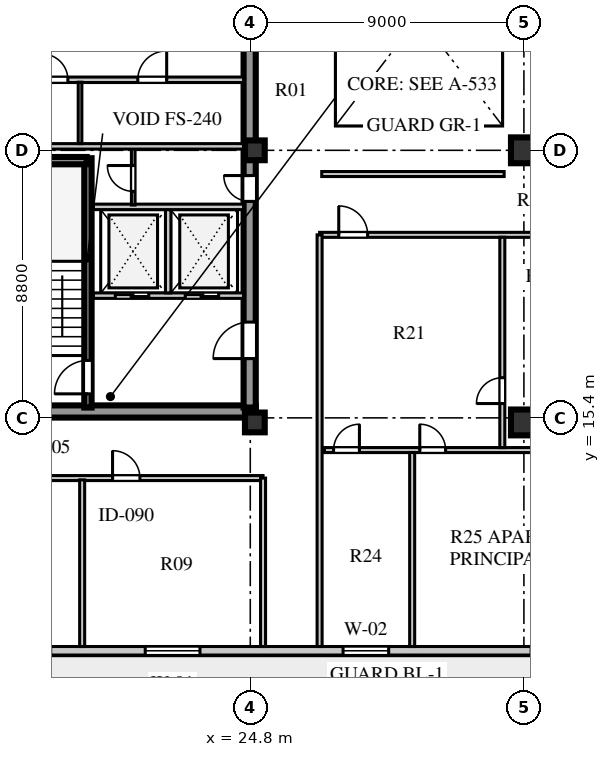
"""IFC4 building model, lengths in metres.
Left out: names, types, materials, properties, quantities, classifications, styles, units other than length and angle.
Written with IfcOpenShell. Run it as: python <this file> out.ifc"""

import sys

from ifc_helpers import new_model, si_unit, direction, frame, frame_2d, origin, origin_2d, place, context, subcontext, project, spatial, rectangle, extrude, element, fill, save


model = new_model("IFC4")
c1 = context("Model", 3, precision=1e-05, world=origin(), true_north=direction((0.0, 1.0)))
c2 = subcontext(c1, "Body", "Model", "MODEL_VIEW")
j1 = project(units=[si_unit("LENGTHUNIT", "METRE"), si_unit("PLANEANGLEUNIT", "RADIAN")], contexts=[c1])
p1 = place(None, origin())
s1 = spatial("IfcSite", under=j1, at=p1, CompositionType="ELEMENT")
p2 = place(p1, origin())
s2 = spatial("IfcBuilding", under=s1, at=p2, CompositionType="ELEMENT")
p3 = place(p2, frame((0.0, 0.0, 253.1)))
s3 = spatial("IfcBuildingStorey", under=s2, at=p3, CompositionType="ELEMENT", Elevation=253.1)
p4 = place(p3, frame((15.5, 15.61, 0.0), z_axis=(0.0, 0.0, 1.0), x_axis=(1.0, 0.0, 0.0)))
e1 = element("IfcWall", 1, at=p4, inside=s3, PredefinedType="SHEAR", context=c2, shape_type="SweptSolid", body=[
    extrude(rectangle(XDim=9.48, YDim=0.4, at=frame_2d((4.74, 0.0))), origin(), (0.0, 0.0, 1.0), 3.66),
])
p5 = place(p3, frame((24.78, 15.74, 0.0), z_axis=(0.0, 0.0, 1.0), x_axis=(0.0, 1.0, 0.0)))
e2 = element("IfcWall", 2, at=p5, inside=s3, PredefinedType="SHEAR", context=c2, shape_type="SweptSolid", body=[
    extrude(rectangle(XDim=25.76, YDim=0.4, at=frame_2d((12.88, 0.0))), origin(), (0.0, 0.0, 1.0), 3.66),
])
p6 = place(p5, frame((1.61, 0.0, 0.0)))
e3 = element("IfcOpeningElement", 3, at=p6, cuts=e2, PredefinedType="OPENING", context=c2, shape_type="SweptSolid", body=[
    extrude(rectangle(XDim=1.2, YDim=2.1, at=frame_2d((0.6, 1.05))), frame((0.0, 0.21, 0.0), z_axis=(0.0, -1.0, 0.0), x_axis=(1.0, 0.0, 0.0)), (0.0, 0.0, 1.0), 0.42),
])
p7 = place(p5, frame((6.78, 0.0, 0.0)))
e4 = element("IfcOpeningElement", 4, at=p7, cuts=e2, PredefinedType="OPENING", context=c2, shape_type="SweptSolid", body=[
    extrude(rectangle(XDim=0.85, YDim=2.06, at=frame_2d((0.425, 1.03))), frame((0.0, 0.21, 0.0), z_axis=(0.0, -1.0, 0.0), x_axis=(1.0, 0.0, 0.0)), (0.0, 0.0, 1.0), 0.42),
])
p8 = place(p5, frame((12.11, 0.0, 0.0)))
e5 = element("IfcOpeningElement", 5, at=p8, cuts=e2, PredefinedType="OPENING", context=c2, shape_type="SweptSolid", body=[
    extrude(rectangle(XDim=1.5, YDim=2.12, at=frame_2d((0.75, 1.06))), frame((0.0, 0.21, 0.0), z_axis=(0.0, -1.0, 0.0), x_axis=(1.0, 0.0, 0.0)), (0.0, 0.0, 1.0), 0.42),
])
p9 = place(p5, frame((20.11, 0.0, 0.0)))
e6 = element("IfcOpeningElement", 6, at=p9, cuts=e2, PredefinedType="OPENING", context=c2, shape_type="SweptSolid", body=[
    extrude(rectangle(XDim=1.2, YDim=2.12, at=frame_2d((0.6, 1.06))), frame((0.0, 0.21, 0.0), z_axis=(0.0, -1.0, 0.0), x_axis=(1.0, 0.0, 0.0)), (0.0, 0.0, 1.0), 0.42),
])
p10 = place(p5, frame((24.01, 0.0, 0.0)))
e7 = element("IfcOpeningElement", 7, at=p10, cuts=e2, PredefinedType="OPENING", context=c2, shape_type="SweptSolid", body=[
    extrude(rectangle(XDim=0.95, YDim=2.1, at=frame_2d((0.475, 1.05))), frame((0.0, 0.21, 0.0), z_axis=(0.0, -1.0, 0.0), x_axis=(1.0, 0.0, 0.0)), (0.0, 0.0, 1.0), 0.42),
])
for number, where, z_axis, x_axis in (
    (8, (24.95, 15.25, 0.0), (0.0, 0.0, 1.0), (1.0, 0.0, 0.0)),
    (9, (24.95, 24.2, 0.0), (0.0, 0.0, 1.0), (1.0, 0.0, 0.0)),
):
    element("IfcColumn", number, at=place(p3, frame(where, z_axis=z_axis, x_axis=x_axis)), inside=s3, PredefinedType="COLUMN", context=c2, shape_type="SweptSolid", body=[
        extrude(rectangle(XDim=0.65, YDim=0.65, at=origin_2d()), origin(), (0.0, 0.0, 1.0), 3.66),
    ])
for number, where, z_axis, x_axis in (
    (10, (33.8, 15.25, 0.0), (0.0, 0.0, 1.0), (1.0, 0.0, 0.0)),
    (11, (33.8, 24.2, 0.0), (0.0, 0.0, 1.0), (1.0, 0.0, 0.0)),
):
    element("IfcColumn", number, at=place(p3, frame(where, z_axis=z_axis, x_axis=x_axis)), inside=s3, PredefinedType="COLUMN", context=c2, shape_type="SweptSolid", body=[
        extrude(rectangle(XDim=0.85, YDim=0.85, at=origin_2d()), origin(), (0.0, 0.0, 1.0), 3.66),
    ])
p11 = place(p3, frame((13.05, 7.74, 0.0), z_axis=(0.0, 0.0, 1.0), x_axis=(1.0, 0.0, 0.0)))
e12 = element("IfcWall", 12, at=p11, inside=s3, PredefinedType="STANDARD", context=c2, shape_type="SweptSolid", body=[
    extrude(rectangle(XDim=32.5, YDim=0.28, at=frame_2d((16.25, 0.0))), origin(), (0.0, 0.0, 1.0), 3.66),
])
p12 = place(p11, frame((0.95, 0.0, 0.0)))
e13 = element("IfcOpeningElement", 13, at=p12, cuts=e12, PredefinedType="OPENING", context=c2, shape_type="SweptSolid", body=[
    extrude(rectangle(XDim=1.0, YDim=2.05, at=frame_2d((0.5, 1.025))), frame((0.0, 0.15, 0.0), z_axis=(0.0, -1.0, 0.0), x_axis=(1.0, 0.0, 0.0)), (0.0, 0.0, 1.0), 0.3),
])
p13 = place(p11, frame((2.935, 0.0, 0.8)))
e14 = element("IfcOpeningElement", 14, at=p13, cuts=e12, PredefinedType="OPENING", context=c2, shape_type="SweptSolid", body=[
    extrude(rectangle(XDim=2.25, YDim=2.0, at=frame_2d((1.125, 1.0))), frame((0.0, 0.15, 0.0), z_axis=(0.0, -1.0, 0.0), x_axis=(1.0, 0.0, 0.0)), (0.0, 0.0, 1.0), 0.3),
])
p14 = place(p11, frame((8.295, 0.0, 0.8)))
e15 = element("IfcOpeningElement", 15, at=p14, cuts=e12, PredefinedType="OPENING", context=c2, shape_type="SweptSolid", body=[
    extrude(rectangle(XDim=1.8, YDim=2.0, at=frame_2d((0.9, 1.0))), frame((0.0, 0.15, 0.0), z_axis=(0.0, -1.0, 0.0), x_axis=(1.0, 0.0, 0.0)), (0.0, 0.0, 1.0), 0.3),
])
p15 = place(p11, frame((14.802, 0.0, 0.8)))
e16 = element("IfcOpeningElement", 16, at=p15, cuts=e12, PredefinedType="OPENING", context=c2, shape_type="SweptSolid", body=[
    extrude(rectangle(XDim=1.5, YDim=2.0, at=frame_2d((0.75, 1.0))), frame((0.0, 0.15, 0.0), z_axis=(0.0, -1.0, 0.0), x_axis=(1.0, 0.0, 0.0)), (0.0, 0.0, 1.0), 0.3),
])
p16 = place(p11, frame((20.988, 0.0, 0.8)))
e17 = element("IfcOpeningElement", 17, at=p16, cuts=e12, PredefinedType="OPENING", context=c2, shape_type="SweptSolid", body=[
    extrude(rectangle(XDim=1.2, YDim=1.75, at=frame_2d((0.6, 0.875))), frame((0.0, 0.15, 0.0), z_axis=(0.0, -1.0, 0.0), x_axis=(1.0, 0.0, 0.0)), (0.0, 0.0, 1.0), 0.3),
])
p17 = place(p11, frame((28.045, 0.0, 0.8)))
e18 = element("IfcOpeningElement", 18, at=p17, cuts=e12, PredefinedType="OPENING", context=c2, shape_type="SweptSolid", body=[
    extrude(rectangle(XDim=2.4, YDim=2.05, at=frame_2d((1.2, 1.025))), frame((0.0, 0.15, 0.0), z_axis=(0.0, -1.0, 0.0), x_axis=(1.0, 0.0, 0.0)), (0.0, 0.0, 1.0), 0.3),
])
p18 = place(p3, frame((19.46, 15.74, 0.0), z_axis=(0.0, 0.0, 1.0), x_axis=(0.0, 1.0, 0.0)))
e19 = element("IfcWall", 19, at=p18, inside=s3, PredefinedType="SHEAR", context=c2, shape_type="SweptSolid", body=[
    extrude(rectangle(XDim=8.2, YDim=0.24, at=frame_2d((4.1, 0.0))), origin(), (0.0, 0.0, 1.0), 3.9),
])
p19 = place(p18, frame((0.45, 0.0, 0.0)))
e20 = element("IfcOpeningElement", 20, at=p19, cuts=e19, PredefinedType="OPENING", context=c2, shape_type="SweptSolid", body=[
    extrude(rectangle(XDim=1.1, YDim=2.1, at=frame_2d((0.55, 1.05))), frame((0.0, 0.13, 0.0), z_axis=(0.0, -1.0, 0.0), x_axis=(1.0, 0.0, 0.0)), (0.0, 0.0, 1.0), 0.26),
])
p20 = place(p3, frame((15.9, 23.86, 0.0), z_axis=(0.0, 0.0, 1.0), x_axis=(1.0, 0.0, 0.0)))
e21 = element("IfcWall", 21, at=p20, inside=s3, PredefinedType="SHEAR", context=c2, shape_type="SweptSolid", body=[
    extrude(rectangle(XDim=3.52, YDim=0.24, at=frame_2d((1.76, 0.0))), origin(), (0.0, 0.0, 1.0), 3.9),
])
p21 = place(p3, frame((19.64, 19.42, 0.0), z_axis=(0.0, 0.0, 1.0), x_axis=(1.0, 0.0, 0.0)))
e22 = element("IfcWall", 22, at=p21, inside=s3, PredefinedType="SOLIDWALL", context=c2, shape_type="SweptSolid", body=[
    extrude(rectangle(XDim=4.94, YDim=0.18, at=frame_2d((2.47, 0.0))), origin(), (0.0, 0.0, 1.0), 3.66),
])
p22 = place(p21, frame((0.72, 0.0, 0.0)))
e23 = element("IfcOpeningElement", 23, at=p22, cuts=e22, PredefinedType="OPENING", context=c2, shape_type="SweptSolid", body=[
    extrude(rectangle(XDim=1.1, YDim=2.1, at=frame_2d((0.55, 1.05))), frame((0.0, 0.1, 0.0), z_axis=(0.0, -1.0, 0.0), x_axis=(1.0, 0.0, 0.0)), (0.0, 0.0, 1.0), 0.2),
])
p23 = place(p21, frame((3.02, 0.0, 0.0)))
e24 = element("IfcOpeningElement", 24, at=p23, cuts=e22, PredefinedType="OPENING", context=c2, shape_type="SweptSolid", body=[
    extrude(rectangle(XDim=1.1, YDim=2.1, at=frame_2d((0.55, 1.05))), frame((0.0, 0.1, 0.0), z_axis=(0.0, -1.0, 0.0), x_axis=(1.0, 0.0, 0.0)), (0.0, 0.0, 1.0), 0.2),
])
p24 = place(p3, frame((22.1, 19.51, 0.0), z_axis=(0.0, 0.0, 1.0), x_axis=(0.0, 1.0, 0.0)))
e25 = element("IfcWall", 25, at=p24, inside=s3, PredefinedType="SOLIDWALL", context=c2, shape_type="SweptSolid", body=[
    extrude(rectangle(XDim=2.74, YDim=0.18, at=frame_2d((1.37, 0.0))), origin(), (0.0, 0.0, 1.0), 3.66),
])
p25 = place(p3, frame((19.64, 22.34, 0.0), z_axis=(0.0, 0.0, 1.0), x_axis=(1.0, 0.0, 0.0)))
e26 = element("IfcWall", 26, at=p25, inside=s3, PredefinedType="SOLIDWALL", context=c2, shape_type="SweptSolid", body=[
    extrude(rectangle(XDim=4.94, YDim=0.18, at=frame_2d((2.47, 0.0))), origin(), (0.0, 0.0, 1.0), 3.66),
])
p26 = place(p3, frame((20.95, 22.4, 0.0), z_axis=(0.0, 0.0, 1.0), x_axis=(0.0, 1.0, 0.0)))
e27 = element("IfcWall", 27, at=p26, inside=s3, PredefinedType="PARTITIONING", context=c2, shape_type="SweptSolid", body=[
    extrude(rectangle(XDim=1.88, YDim=0.12, at=frame_2d((0.94, 0.0))), origin(), (0.0, 0.0, 1.0), 3.66),
])
p27 = place(p26, frame((0.45, 0.0, 0.0)))
e28 = element("IfcOpeningElement", 28, at=p27, cuts=e27, PredefinedType="OPENING", context=c2, shape_type="SweptSolid", body=[
    extrude(rectangle(XDim=0.85, YDim=2.06, at=frame_2d((0.425, 1.03))), frame((0.0, 0.07, 0.0), z_axis=(0.0, -1.0, 0.0), x_axis=(1.0, 0.0, 0.0)), (0.0, 0.0, 1.0), 0.14),
])
p28 = place(p3, frame((15.9, 26.52, 0.0), z_axis=(0.0, 0.0, 1.0), x_axis=(1.0, 0.0, 0.0)))
e29 = element("IfcWall", 29, at=p28, inside=s3, PredefinedType="SOLIDWALL", context=c2, shape_type="SweptSolid", body=[
    extrude(rectangle(XDim=8.68, YDim=0.18, at=frame_2d((4.34, 0.0))), origin(), (0.0, 0.0, 1.0), 3.66),
])
p29 = place(p28, frame((2.05, 0.0, 0.0)))
e30 = element("IfcOpeningElement", 30, at=p29, cuts=e29, PredefinedType="OPENING", context=c2, shape_type="SweptSolid", body=[
    extrude(rectangle(XDim=0.85, YDim=2.06, at=frame_2d((0.425, 1.03))), frame((0.0, 0.1, 0.0), z_axis=(0.0, -1.0, 0.0), x_axis=(1.0, 0.0, 0.0)), (0.0, 0.0, 1.0), 0.2),
])
p30 = place(p28, frame((5.2, 0.0, 0.0)))
e31 = element("IfcOpeningElement", 31, at=p30, cuts=e29, PredefinedType="OPENING", context=c2, shape_type="SweptSolid", body=[
    extrude(rectangle(XDim=0.95, YDim=2.1, at=frame_2d((0.475, 1.05))), frame((0.0, 0.1, 0.0), z_axis=(0.0, -1.0, 0.0), x_axis=(1.0, 0.0, 0.0)), (0.0, 0.0, 1.0), 0.2),
])
p31 = place(p3, frame((15.9, 24.33, 0.0), z_axis=(0.0, 0.0, 1.0), x_axis=(1.0, 0.0, 0.0)))
e32 = element("IfcWall", 32, at=p31, inside=s3, PredefinedType="SOLIDWALL", context=c2, shape_type="SweptSolid", body=[
    extrude(rectangle(XDim=8.68, YDim=0.18, at=frame_2d((4.34, 0.0))), origin(), (0.0, 0.0, 1.0), 3.06),
])
p32 = place(p3, frame((19.2, 24.42, 0.0), z_axis=(0.0, 0.0, 1.0), x_axis=(0.0, 1.0, 0.0)))
e33 = element("IfcWall", 33, at=p32, inside=s3, PredefinedType="PARTITIONING", context=c2, shape_type="SweptSolid", body=[
    extrude(rectangle(XDim=2.02, YDim=0.12, at=frame_2d((1.01, 0.0))), origin(), (0.0, 0.0, 1.0), 3.66),
])
p33 = place(p3, frame((27.08, 21.42, 0.0), z_axis=(0.0, 0.0, 1.0), x_axis=(1.0, 0.0, 0.0)))
e34 = element("IfcWall", 34, at=p33, inside=s3, PredefinedType="PARTITIONING", context=c2, shape_type="SweptSolid", body=[
    extrude(rectangle(XDim=12.07, YDim=0.165, at=frame_2d((6.035, 0.0))), origin(), (0.0, 0.0, 1.0), 3.31),
])
p34 = place(p33, frame((0.63, 0.0, 0.0)))
e35 = element("IfcOpeningElement", 35, at=p34, cuts=e34, PredefinedType="OPENING", context=c2, shape_type="SweptSolid", body=[
    extrude(rectangle(XDim=0.95, YDim=2.1, at=frame_2d((0.475, 1.05))), frame((0.0, 0.093, 0.0), z_axis=(0.0, -1.0, 0.0), x_axis=(1.0, 0.0, 0.0)), (0.0, 0.0, 1.0), 0.185),
])
p35 = place(p3, frame((27.08, 7.88, 0.0), z_axis=(0.0, 0.0, 1.0), x_axis=(0.0, 1.0, 0.0)))
e36 = element("IfcWall", 36, at=p35, inside=s3, PredefinedType="PARTITIONING", context=c2, shape_type="SweptSolid", body=[
    extrude(rectangle(XDim=13.54, YDim=0.165, at=frame_2d((6.77, 0.0))), origin(), (0.0, 0.0, 1.0), 3.66),
])
p36 = place(p3, frame((27.15, 23.42, 0.0), z_axis=(0.0, 0.0, 1.0), x_axis=(1.0, 0.0, 0.0)))
e37 = element("IfcWall", 37, at=p36, inside=s3, PredefinedType="PARTITIONING", context=c2, shape_type="SweptSolid", body=[
    extrude(rectangle(XDim=6.0, YDim=0.165, at=frame_2d((3.0, 0.0))), origin(), (0.0, 0.0, 1.0), 3.66),
])
p37 = place(p3, frame((13.4, 13.42, 0.0), z_axis=(0.0, 0.0, 1.0), x_axis=(1.0, 0.0, 0.0)))
e38 = element("IfcWall", 38, at=p37, inside=s3, PredefinedType="PARTITIONING", context=c2, shape_type="SweptSolid", body=[
    extrude(rectangle(XDim=11.82, YDim=0.165, at=frame_2d((5.91, 0.0))), origin(), (0.0, 0.0, 1.0), 3.66),
])
p38 = place(p37, frame((0.15, 0.0, 0.0)))
e39 = element("IfcOpeningElement", 39, at=p38, cuts=e38, PredefinedType="OPENING", context=c2, shape_type="SweptSolid", body=[
    extrude(rectangle(XDim=0.9, YDim=2.08, at=frame_2d((0.45, 1.04))), frame((0.0, 0.093, 0.0), z_axis=(0.0, -1.0, 0.0), x_axis=(1.0, 0.0, 0.0)), (0.0, 0.0, 1.0), 0.185),
])
p39 = place(p37, frame((6.87, 0.0, 0.0)))
e40 = element("IfcOpeningElement", 40, at=p39, cuts=e38, PredefinedType="OPENING", context=c2, shape_type="SweptSolid", body=[
    extrude(rectangle(XDim=0.9, YDim=2.08, at=frame_2d((0.45, 1.04))), frame((0.0, 0.093, 0.0), z_axis=(0.0, -1.0, 0.0), x_axis=(1.0, 0.0, 0.0)), (0.0, 0.0, 1.0), 0.185),
])
p40 = place(p3, frame((25.22, 7.88, 0.0), z_axis=(0.0, 0.0, 1.0), x_axis=(0.0, 1.0, 0.0)))
e41 = element("IfcWall", 41, at=p40, inside=s3, PredefinedType="PARTITIONING", context=c2, shape_type="SweptSolid", body=[
    extrude(rectangle(XDim=5.54, YDim=0.165, at=frame_2d((2.77, 0.0))), origin(), (0.0, 0.0, 1.0), 3.21),
])
p41 = place(p3, frame((19.27, 7.88, 0.0), z_axis=(0.0, 0.0, 1.0), x_axis=(0.0, 1.0, 0.0)))
e42 = element("IfcWall", 42, at=p41, inside=s3, PredefinedType="PARTITIONING", context=c2, shape_type="SweptSolid", body=[
    extrude(rectangle(XDim=5.48, YDim=0.165, at=frame_2d((2.74, 0.0))), origin(), (0.0, 0.0, 1.0), 3.66),
])
p42 = place(p3, frame((27.24, 14.341, 0.0), z_axis=(0.0, 0.0, 1.0), x_axis=(1.0, 0.0, 0.0)))
e43 = element("IfcWall", 43, at=p42, inside=s3, PredefinedType="PARTITIONING", context=c2, shape_type="SweptSolid", body=[
    extrude(rectangle(XDim=11.83, YDim=0.165, at=frame_2d((5.915, 0.0))), origin(), (0.0, 0.0, 1.0), 3.66),
])
p43 = place(p42, frame((0.3, 0.0, 0.0)))
e44 = element("IfcOpeningElement", 44, at=p43, cuts=e43, PredefinedType="OPENING", context=c2, shape_type="SweptSolid", body=[
    extrude(rectangle(XDim=0.85, YDim=2.08, at=frame_2d((0.425, 1.04))), frame((0.0, 0.093, 0.0), z_axis=(0.0, -1.0, 0.0), x_axis=(1.0, 0.0, 0.0)), (0.0, 0.0, 1.0), 0.185),
])
p44 = place(p42, frame((3.135, 0.0, 0.0)))
e45 = element("IfcOpeningElement", 45, at=p44, cuts=e43, PredefinedType="OPENING", context=c2, shape_type="SweptSolid", body=[
    extrude(rectangle(XDim=0.85, YDim=2.08, at=frame_2d((0.425, 1.04))), frame((0.0, 0.093, 0.0), z_axis=(0.0, -1.0, 0.0), x_axis=(1.0, 0.0, 0.0)), (0.0, 0.0, 1.0), 0.185),
])
p45 = place(p3, frame((33.09, 14.421, 0.0), z_axis=(0.0, 0.0, 1.0), x_axis=(0.0, 1.0, 0.0)))
e46 = element("IfcWall", 46, at=p45, inside=s3, PredefinedType="PARTITIONING", context=c2, shape_type="SweptSolid", body=[
    extrude(rectangle(XDim=6.919, YDim=0.165, at=frame_2d((3.459, 0.0))), origin(), (0.0, 0.0, 1.0), 3.66),
])
p46 = place(p45, frame((1.45, 0.0, 0.0)))
e47 = element("IfcOpeningElement", 47, at=p46, cuts=e46, PredefinedType="OPENING", context=c2, shape_type="SweptSolid", body=[
    extrude(rectangle(XDim=0.85, YDim=2.08, at=frame_2d((0.425, 1.04))), frame((0.0, 0.093, 0.0), z_axis=(0.0, -1.0, 0.0), x_axis=(1.0, 0.0, 0.0)), (0.0, 0.0, 1.0), 0.185),
])
p47 = place(p3, frame((30.125, 7.88, 0.0), z_axis=(0.0, 0.0, 1.0), x_axis=(0.0, 1.0, 0.0)))
e48 = element("IfcWall", 48, at=p47, inside=s3, PredefinedType="PARTITIONING", context=c2, shape_type="SweptSolid", body=[
    extrude(rectangle(XDim=6.381, YDim=0.165, at=frame_2d((3.19, 0.0))), origin(), (0.0, 0.0, 1.0), 3.66),
])
p48 = place(p14, origin())
e49 = element("IfcWindow", 49, at=p48, inside=s3, PartitioningType="SINGLE_PANEL", PredefinedType="WINDOW", context=c2, shape_type="SweptSolid", body=[
    extrude(rectangle(XDim=1.8, YDim=2.0, at=frame_2d((0.9, 1.0))), frame((0.0, 0.03, 0.0), z_axis=(0.0, -1.0, 0.0), x_axis=(1.0, 0.0, 0.0)), (0.0, 0.0, 1.0), 0.06),
])
fill(e15, e49)
p49 = place(p15, origin())
e50 = element("IfcWindow", 50, at=p49, inside=s3, PartitioningType="SINGLE_PANEL", PredefinedType="WINDOW", context=c2, shape_type="SweptSolid", body=[
    extrude(rectangle(XDim=1.5, YDim=2.0, at=frame_2d((0.75, 1.0))), frame((0.0, 0.03, 0.0), z_axis=(0.0, -1.0, 0.0), x_axis=(1.0, 0.0, 0.0)), (0.0, 0.0, 1.0), 0.06),
])
fill(e16, e50)
p50 = place(p19, origin())
e51 = element("IfcDoor", 51, at=p50, inside=s3, OperationType="SINGLE_SWING_LEFT", PredefinedType="DOOR", context=c2, shape_type="SweptSolid", body=[
    extrude(rectangle(XDim=1.1, YDim=2.1, at=frame_2d((0.55, 1.05))), frame((0.0, 0.025, 0.0), z_axis=(0.0, -1.0, 0.0), x_axis=(1.0, 0.0, 0.0)), (0.0, 0.0, 1.0), 0.05),
])
fill(e20, e51)
p51 = place(p22, origin())
e52 = element("IfcDoor", 52, at=p51, inside=s3, OperationType="DOUBLE_DOOR_SLIDING", PredefinedType="DOOR", context=c2, shape_type="SweptSolid", body=[
    extrude(rectangle(XDim=1.1, YDim=2.1, at=frame_2d((0.55, 1.05))), frame((0.0, 0.025, 0.0), z_axis=(0.0, -1.0, 0.0), x_axis=(1.0, 0.0, 0.0)), (0.0, 0.0, 1.0), 0.05),
])
fill(e23, e52)
p52 = place(p23, origin())
e53 = element("IfcDoor", 53, at=p52, inside=s3, OperationType="DOUBLE_DOOR_SLIDING", PredefinedType="DOOR", context=c2, shape_type="SweptSolid", body=[
    extrude(rectangle(XDim=1.1, YDim=2.1, at=frame_2d((0.55, 1.05))), frame((0.0, 0.025, 0.0), z_axis=(0.0, -1.0, 0.0), x_axis=(1.0, 0.0, 0.0)), (0.0, 0.0, 1.0), 0.05),
])
fill(e24, e53)
p53 = place(p6, frame((1.2, 0.0, 0.0), z_axis=(0.0, 0.0, 1.0), x_axis=(-1.0, 0.0, 0.0)))
e54 = element("IfcDoor", 54, at=p53, inside=s3, OperationType="SINGLE_SWING_RIGHT", PredefinedType="DOOR", context=c2, shape_type="SweptSolid", body=[
    extrude(rectangle(XDim=1.2, YDim=2.1, at=frame_2d((0.6, 1.05))), frame((0.0, 0.025, 0.0), z_axis=(0.0, -1.0, 0.0), x_axis=(1.0, 0.0, 0.0)), (0.0, 0.0, 1.0), 0.05),
])
fill(e3, e54)
p54 = place(p27, origin())
e55 = element("IfcDoor", 55, at=p54, inside=s3, OperationType="SINGLE_SWING_RIGHT", PredefinedType="DOOR", context=c2, shape_type="SweptSolid", body=[
    extrude(rectangle(XDim=0.85, YDim=2.06, at=frame_2d((0.425, 1.03))), frame((0.0, 0.025, 0.0), z_axis=(0.0, -1.0, 0.0), x_axis=(1.0, 0.0, 0.0)), (0.0, 0.0, 1.0), 0.05),
])
fill(e28, e55)
p55 = place(p7, frame((0.85, 0.0, 0.0), z_axis=(0.0, 0.0, 1.0), x_axis=(-1.0, 0.0, 0.0)))
e56 = element("IfcDoor", 56, at=p55, inside=s3, OperationType="SINGLE_SWING_LEFT", PredefinedType="DOOR", context=c2, shape_type="SweptSolid", body=[
    extrude(rectangle(XDim=0.85, YDim=2.06, at=frame_2d((0.425, 1.03))), frame((0.0, 0.025, 0.0), z_axis=(0.0, -1.0, 0.0), x_axis=(1.0, 0.0, 0.0)), (0.0, 0.0, 1.0), 0.05),
])
fill(e4, e56)
p56 = place(p29, origin())
e57 = element("IfcDoor", 57, at=p56, inside=s3, OperationType="SINGLE_SWING_LEFT", PredefinedType="DOOR", context=c2, shape_type="SweptSolid", body=[
    extrude(rectangle(XDim=0.85, YDim=2.06, at=frame_2d((0.425, 1.03))), frame((0.0, 0.025, 0.0), z_axis=(0.0, -1.0, 0.0), x_axis=(1.0, 0.0, 0.0)), (0.0, 0.0, 1.0), 0.05),
])
fill(e30, e57)
p57 = place(p30, origin())
e58 = element("IfcDoor", 58, at=p57, inside=s3, OperationType="SINGLE_SWING_RIGHT", PredefinedType="DOOR", context=c2, shape_type="SweptSolid", body=[
    extrude(rectangle(XDim=0.95, YDim=2.1, at=frame_2d((0.475, 1.05))), frame((0.0, 0.025, 0.0), z_axis=(0.0, -1.0, 0.0), x_axis=(1.0, 0.0, 0.0)), (0.0, 0.0, 1.0), 0.05),
])
fill(e31, e58)
p58 = place(p39, frame((0.9, 0.0, 0.0), z_axis=(0.0, 0.0, 1.0), x_axis=(-1.0, 0.0, 0.0)))
e59 = element("IfcDoor", 59, at=p58, inside=s3, OperationType="SINGLE_SWING_RIGHT", PredefinedType="DOOR", context=c2, shape_type="SweptSolid", body=[
    extrude(rectangle(XDim=0.9, YDim=2.08, at=frame_2d((0.45, 1.04))), frame((0.0, 0.025, 0.0), z_axis=(0.0, -1.0, 0.0), x_axis=(1.0, 0.0, 0.0)), (0.0, 0.0, 1.0), 0.05),
])
fill(e40, e59)
p59 = place(p46, origin())
e60 = element("IfcDoor", 60, at=p59, inside=s3, OperationType="SINGLE_SWING_LEFT", PredefinedType="DOOR", context=c2, shape_type="SweptSolid", body=[
    extrude(rectangle(XDim=0.85, YDim=2.08, at=frame_2d((0.425, 1.04))), frame((0.0, 0.025, 0.0), z_axis=(0.0, -1.0, 0.0), x_axis=(1.0, 0.0, 0.0)), (0.0, 0.0, 1.0), 0.05),
])
fill(e47, e60)
p60 = place(p43, frame((0.85, 0.0, 0.0), z_axis=(0.0, 0.0, 1.0), x_axis=(-1.0, 0.0, 0.0)))
e61 = element("IfcDoor", 61, at=p60, inside=s3, OperationType="SINGLE_SWING_LEFT", PredefinedType="DOOR", context=c2, shape_type="SweptSolid", body=[
    extrude(rectangle(XDim=0.85, YDim=2.08, at=frame_2d((0.425, 1.04))), frame((0.0, 0.025, 0.0), z_axis=(0.0, -1.0, 0.0), x_axis=(1.0, 0.0, 0.0)), (0.0, 0.0, 1.0), 0.05),
])
fill(e44, e61)
p61 = place(p44, frame((0.85, 0.0, 0.0), z_axis=(0.0, 0.0, 1.0), x_axis=(-1.0, 0.0, 0.0)))
e62 = element("IfcDoor", 62, at=p61, inside=s3, OperationType="SINGLE_SWING_RIGHT", PredefinedType="DOOR", context=c2, shape_type="SweptSolid", body=[
    extrude(rectangle(XDim=0.85, YDim=2.08, at=frame_2d((0.425, 1.04))), frame((0.0, 0.025, 0.0), z_axis=(0.0, -1.0, 0.0), x_axis=(1.0, 0.0, 0.0)), (0.0, 0.0, 1.0), 0.05),
])
fill(e45, e62)
p62 = place(p34, frame((0.95, 0.0, 0.0), z_axis=(0.0, 0.0, 1.0), x_axis=(-1.0, 0.0, 0.0)))
e63 = element("IfcDoor", 63, at=p62, inside=s3, OperationType="SINGLE_SWING_RIGHT", PredefinedType="DOOR", context=c2, shape_type="SweptSolid", body=[
    extrude(rectangle(XDim=0.95, YDim=2.1, at=frame_2d((0.475, 1.05))), frame((0.0, 0.025, 0.0), z_axis=(0.0, -1.0, 0.0), x_axis=(1.0, 0.0, 0.0)), (0.0, 0.0, 1.0), 0.05),
])
fill(e35, e63)
save(model, sys.argv[1])
